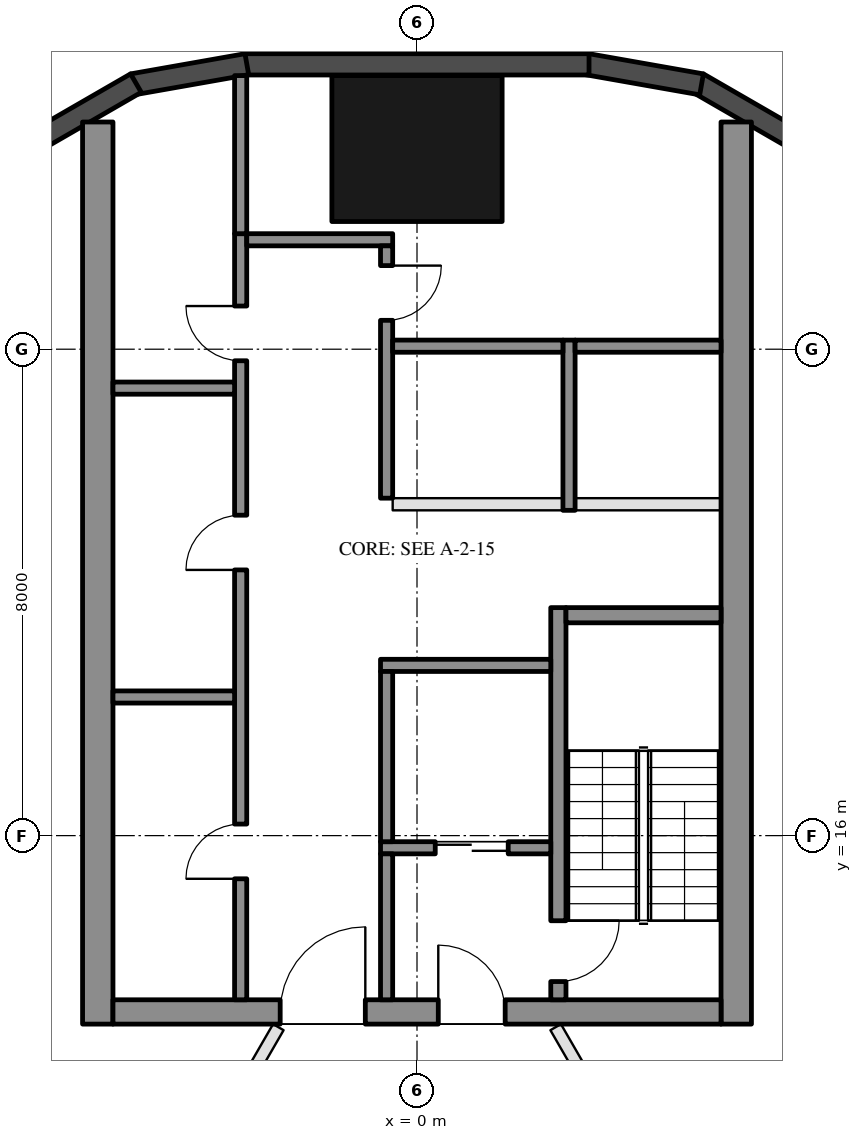
"""IFC4 building model, lengths in metres.
Left out: names, types, materials, properties, quantities, classifications, styles, units other than length and angle.
Written with IfcOpenShell. Run it as: python <this file> out.ifc"""

import sys

from ifc_helpers import new_model, si_unit, direction, frame, frame_2d, origin, origin_2d, place, context, subcontext, project, spatial, rectangle, hollow_rectangle, extrude, element, fill, save


model = new_model("IFC4")
c1 = context("Model", 3, precision=1e-05, world=origin(), true_north=direction((0.0, 1.0)))
c2 = subcontext(c1, "Body", "Model", "MODEL_VIEW")
j1 = project(units=[si_unit("LENGTHUNIT", "METRE"), si_unit("PLANEANGLEUNIT", "RADIAN")], contexts=[c1])
p1 = place(None, origin())
s1 = spatial("IfcSite", under=j1, at=p1, CompositionType="ELEMENT")
p2 = place(p1, origin())
s2 = spatial("IfcBuilding", under=s1, at=p2, CompositionType="ELEMENT")
p3 = place(p2, frame((0.0, 0.0, 76.1)))
s3 = spatial("IfcBuildingStorey", under=s2, at=p3, CompositionType="ELEMENT", Elevation=76.1)
p4 = place(p3, frame((0.0, 27.3, 0.0), z_axis=(0.0, 0.0, 1.0), x_axis=(1.0, 0.0, 0.0)))
e1 = element("IfcColumn", 1, at=p4, inside=s3, PredefinedType="COLUMN", context=c2, shape_type="SweptSolid", body=[
    extrude(hollow_rectangle(XDim=2.8, YDim=2.4, WallThickness=0.07, at=origin_2d()), origin(), (0.0, 0.0, 1.0), 3.7),
])
for number, where, z_axis, x_axis in (
    (2, (6.277, 27.422, 0.0), (0.0, 0.0, 1.0), (-0.866, 0.5, 0.0)),
    (3, (4.68, 28.356, 0.0), (0.0, 0.0, 1.0), (-0.985, 0.174, 0.0)),
):
    element("IfcWall", number, at=place(p3, frame(where, z_axis=z_axis, x_axis=x_axis)), inside=s3, PredefinedType="SOLIDWALL", context=c2, shape_type="SweptSolid", body=[
        extrude(rectangle(XDim=1.91, YDim=0.35, at=frame_2d((0.955, 0.0))), origin(), (0.0, 0.0, 1.0), 3.55),
    ])
p5 = place(p3, frame((2.829, 28.685, 0.0), z_axis=(0.0, 0.0, 1.0), x_axis=(-1.0, 0.0, 0.0)))
e4 = element("IfcWall", 4, at=p5, inside=s3, PredefinedType="SOLIDWALL", context=c2, shape_type="SweptSolid", body=[
    extrude(rectangle(XDim=5.658, YDim=0.35, at=frame_2d((2.829, 0.0))), origin(), (0.0, 0.0, 1.0), 3.55),
])
for number, where, z_axis, x_axis in (
    (5, (-2.799, 28.688, 0.0), (0.0, 0.0, 1.0), (-0.985, -0.174, 0.0)),
    (6, (-4.623, 28.377, 0.0), (0.0, 0.0, 1.0), (-0.866, -0.5, 0.0)),
):
    element("IfcWall", number, at=place(p3, frame(where, z_axis=z_axis, x_axis=x_axis)), inside=s3, PredefinedType="SOLIDWALL", context=c2, shape_type="SweptSolid", body=[
        extrude(rectangle(XDim=1.91, YDim=0.35, at=frame_2d((0.955, 0.0))), origin(), (0.0, 0.0, 1.0), 3.55),
    ])
for number, where, z_axis, x_axis in (
    (7, (5.25, 12.9, 0.0), (0.0, 0.0, 1.0), (0.0, 1.0, 0.0)),
    (8, (-5.25, 12.9, 0.0), (0.0, 0.0, 1.0), (0.0, 1.0, 0.0)),
):
    element("IfcWall", number, at=place(p3, frame(where, z_axis=z_axis, x_axis=x_axis)), inside=s3, PredefinedType="SHEAR", context=c2, shape_type="SweptSolid", body=[
        extrude(rectangle(XDim=14.837, YDim=0.5, at=frame_2d((7.418, 0.0))), origin(), (0.0, 0.0, 1.0), 3.5),
    ])
p6 = place(p3, frame((5.0, 13.1, 0.0), z_axis=(0.0, 0.0, 1.0), x_axis=(-1.0, 0.0, 0.0)))
e9 = element("IfcWall", 9, at=p6, inside=s3, PredefinedType="SHEAR", context=c2, shape_type="SweptSolid", body=[
    extrude(rectangle(XDim=10.0, YDim=0.4, at=frame_2d((5.0, 0.0))), origin(), (0.0, 0.0, 1.0), 3.5),
])
p7 = place(p6, frame((3.55, 0.0, 0.0)))
e10 = element("IfcOpeningElement", 10, at=p7, cuts=e9, PredefinedType="OPENING", context=c2, shape_type="SweptSolid", body=[
    extrude(rectangle(XDim=1.1, YDim=2.1, at=frame_2d((0.55, 1.05))), frame((0.0, 0.21, 0.0), z_axis=(0.0, -1.0, 0.0), x_axis=(1.0, 0.0, 0.0)), (0.0, 0.0, 1.0), 0.42),
])
p8 = place(p6, frame((5.85, 0.0, 0.0)))
e11 = element("IfcOpeningElement", 11, at=p8, cuts=e9, PredefinedType="OPENING", context=c2, shape_type="SweptSolid", body=[
    extrude(rectangle(XDim=1.4, YDim=2.1, at=frame_2d((0.7, 1.05))), frame((0.0, 0.21, 0.0), z_axis=(0.0, -1.0, 0.0), x_axis=(1.0, 0.0, 0.0)), (0.0, 0.0, 1.0), 0.42),
])
p9 = place(p3, frame((2.325, 13.3, 0.0), z_axis=(0.0, 0.0, 1.0), x_axis=(0.0, 1.0, 0.0)))
e12 = element("IfcWall", 12, at=p9, inside=s3, PredefinedType="SHEAR", context=c2, shape_type="SweptSolid", body=[
    extrude(rectangle(XDim=6.45, YDim=0.25, at=frame_2d((3.225, 0.0))), origin(), (0.0, 0.0, 1.0), 3.5),
])
p10 = place(p9, frame((0.3, 0.0, 0.0)))
e13 = element("IfcOpeningElement", 13, at=p10, cuts=e12, PredefinedType="OPENING", context=c2, shape_type="SweptSolid", body=[
    extrude(rectangle(XDim=1.0, YDim=2.1, at=frame_2d((0.5, 1.05))), frame((0.0, 0.135, 0.0), z_axis=(0.0, -1.0, 0.0), x_axis=(1.0, 0.0, 0.0)), (0.0, 0.0, 1.0), 0.27),
])
p11 = place(p3, frame((5.0, 19.625, 0.0), z_axis=(0.0, 0.0, 1.0), x_axis=(-1.0, 0.0, 0.0)))
e14 = element("IfcWall", 14, at=p11, inside=s3, PredefinedType="SHEAR", context=c2, shape_type="SweptSolid", body=[
    extrude(rectangle(XDim=2.55, YDim=0.25, at=frame_2d((1.275, 0.0))), origin(), (0.0, 0.0, 1.0), 3.5),
])
p12 = place(p3, frame((2.2, 18.8, 0.0), z_axis=(0.0, 0.0, 1.0), x_axis=(-1.0, 0.0, 0.0)))
e15 = element("IfcWall", 15, at=p12, inside=s3, PredefinedType="SHEAR", context=c2, shape_type="SweptSolid", body=[
    extrude(rectangle(XDim=2.8, YDim=0.2, at=frame_2d((1.4, 0.0))), origin(), (0.0, 0.0, 1.0), 3.5),
])
p13 = place(p3, frame((2.2, 15.8, 0.0), z_axis=(0.0, 0.0, 1.0), x_axis=(-1.0, 0.0, 0.0)))
e16 = element("IfcWall", 16, at=p13, inside=s3, PredefinedType="SHEAR", context=c2, shape_type="SweptSolid", body=[
    extrude(rectangle(XDim=2.8, YDim=0.2, at=frame_2d((1.4, 0.0))), origin(), (0.0, 0.0, 1.0), 3.5),
])
p14 = place(p13, frame((0.7, 0.0, 0.0)))
e17 = element("IfcOpeningElement", 17, at=p14, cuts=e16, PredefinedType="OPENING", context=c2, shape_type="SweptSolid", body=[
    extrude(rectangle(XDim=1.2, YDim=2.1, at=frame_2d((0.6, 1.05))), frame((0.0, 0.11, 0.0), z_axis=(0.0, -1.0, 0.0), x_axis=(1.0, 0.0, 0.0)), (0.0, 0.0, 1.0), 0.22),
])
p15 = place(p3, frame((-0.5, 15.9, 0.0), z_axis=(0.0, 0.0, 1.0), x_axis=(0.0, 1.0, 0.0)))
e18 = element("IfcWall", 18, at=p15, inside=s3, PredefinedType="SHEAR", context=c2, shape_type="SweptSolid", body=[
    extrude(rectangle(XDim=2.8, YDim=0.2, at=frame_2d((1.4, 0.0))), origin(), (0.0, 0.0, 1.0), 3.5),
])
p16 = place(p3, frame((-0.5, 13.3, 0.0), z_axis=(0.0, 0.0, 1.0), x_axis=(0.0, 1.0, 0.0)))
e19 = element("IfcWall", 19, at=p16, inside=s3, PredefinedType="SHEAR", context=c2, shape_type="SweptSolid", body=[
    extrude(rectangle(XDim=2.4, YDim=0.2, at=frame_2d((1.2, 0.0))), origin(), (0.0, 0.0, 1.0), 3.5),
])
p17 = place(p3, frame((-2.9, 13.3, 0.0), z_axis=(0.0, 0.0, 1.0), x_axis=(0.0, 1.0, 0.0)))
e20 = element("IfcWall", 20, at=p17, inside=s3, PredefinedType="SHEAR", context=c2, shape_type="SweptSolid", body=[
    extrude(rectangle(XDim=12.6, YDim=0.2, at=frame_2d((6.3, 0.0))), origin(), (0.0, 0.0, 1.0), 3.5),
])
p18 = place(p17, frame((1.99, 0.0, 0.0)))
e21 = element("IfcOpeningElement", 21, at=p18, cuts=e20, PredefinedType="OPENING", context=c2, shape_type="SweptSolid", body=[
    extrude(rectangle(XDim=0.9, YDim=2.1, at=frame_2d((0.45, 1.05))), frame((0.0, 0.11, 0.0), z_axis=(0.0, -1.0, 0.0), x_axis=(1.0, 0.0, 0.0)), (0.0, 0.0, 1.0), 0.22),
])
p19 = place(p17, frame((7.07, 0.0, 0.0)))
e22 = element("IfcOpeningElement", 22, at=p19, cuts=e20, PredefinedType="OPENING", context=c2, shape_type="SweptSolid", body=[
    extrude(rectangle(XDim=0.9, YDim=2.1, at=frame_2d((0.45, 1.05))), frame((0.0, 0.11, 0.0), z_axis=(0.0, -1.0, 0.0), x_axis=(1.0, 0.0, 0.0)), (0.0, 0.0, 1.0), 0.22),
])
p20 = place(p17, frame((10.51, 0.0, 0.0)))
e23 = element("IfcOpeningElement", 23, at=p20, cuts=e20, PredefinedType="OPENING", context=c2, shape_type="SweptSolid", body=[
    extrude(rectangle(XDim=0.9, YDim=2.1, at=frame_2d((0.45, 1.05))), frame((0.0, 0.11, 0.0), z_axis=(0.0, -1.0, 0.0), x_axis=(1.0, 0.0, 0.0)), (0.0, 0.0, 1.0), 0.22),
])
p21 = place(p3, frame((-0.4, 25.8, 0.0), z_axis=(0.0, 0.0, 1.0), x_axis=(-1.0, 0.0, 0.0)))
e24 = element("IfcWall", 24, at=p21, inside=s3, PredefinedType="SHEAR", context=c2, shape_type="SweptSolid", body=[
    extrude(rectangle(XDim=2.4, YDim=0.2, at=frame_2d((1.2, 0.0))), origin(), (0.0, 0.0, 1.0), 3.5),
])
p22 = place(p3, frame((-0.5, 21.55, 0.0), z_axis=(0.0, 0.0, 1.0), x_axis=(0.0, 1.0, 0.0)))
e25 = element("IfcWall", 25, at=p22, inside=s3, PredefinedType="SHEAR", context=c2, shape_type="SweptSolid", body=[
    extrude(rectangle(XDim=4.15, YDim=0.2, at=frame_2d((2.075, 0.0))), origin(), (0.0, 0.0, 1.0), 3.5),
])
p23 = place(p22, frame((2.925, 0.0, 0.0)))
e26 = element("IfcOpeningElement", 26, at=p23, cuts=e25, PredefinedType="OPENING", context=c2, shape_type="SweptSolid", body=[
    extrude(rectangle(XDim=0.9, YDim=2.1, at=frame_2d((0.45, 1.05))), frame((0.0, 0.11, 0.0), z_axis=(0.0, -1.0, 0.0), x_axis=(1.0, 0.0, 0.0)), (0.0, 0.0, 1.0), 0.22),
])
for number, where, z_axis, x_axis in (
    (27, (-3.0, 18.28, 0.0), (0.0, 0.0, 1.0), (-1.0, 0.0, 0.0)),
    (28, (-3.0, 23.36, 0.0), (0.0, 0.0, 1.0), (-1.0, 0.0, 0.0)),
):
    element("IfcWall", number, at=place(p3, frame(where, z_axis=z_axis, x_axis=x_axis)), inside=s3, PredefinedType="SHEAR", context=c2, shape_type="SweptSolid", body=[
        extrude(rectangle(XDim=2.0, YDim=0.2, at=frame_2d((1.0, 0.0))), origin(), (0.0, 0.0, 1.0), 3.5),
    ])
p24 = place(p3, frame((-2.9, 25.9, 0.0), z_axis=(0.0, 0.0, 1.0), x_axis=(0.0, 1.0, 0.0)))
e29 = element("IfcWall", 29, at=p24, inside=s3, PredefinedType="SHEAR", context=c2, shape_type="SweptSolid", body=[
    extrude(rectangle(XDim=2.6, YDim=0.2, at=frame_2d((1.3, 0.0))), origin(), (0.0, 0.0, 1.0), 3.5),
])
p25 = place(p3, frame((2.5, 21.35, 0.0), z_axis=(0.0, 0.0, 1.0), x_axis=(0.0, 1.0, 0.0)))
e30 = element("IfcWall", 30, at=p25, inside=s3, PredefinedType="SHEAR", context=c2, shape_type="SweptSolid", body=[
    extrude(rectangle(XDim=2.8, YDim=0.2, at=frame_2d((1.4, 0.0))), origin(), (0.0, 0.0, 1.0), 3.5),
])
p26 = place(p3, frame((5.0, 24.05, 0.0), z_axis=(0.0, 0.0, 1.0), x_axis=(-1.0, 0.0, 0.0)))
e31 = element("IfcWall", 31, at=p26, inside=s3, PredefinedType="SHEAR", context=c2, shape_type="SweptSolid", body=[
    extrude(rectangle(XDim=2.4, YDim=0.2, at=frame_2d((1.2, 0.0))), origin(), (0.0, 0.0, 1.0), 3.5),
])
p27 = place(p3, frame((2.4, 24.05, 0.0), z_axis=(0.0, 0.0, 1.0), x_axis=(-1.0, 0.0, 0.0)))
e32 = element("IfcWall", 32, at=p27, inside=s3, PredefinedType="SHEAR", context=c2, shape_type="SweptSolid", body=[
    extrude(rectangle(XDim=2.8, YDim=0.2, at=frame_2d((1.4, 0.0))), origin(), (0.0, 0.0, 1.0), 3.5),
])
p28 = place(p3, frame((5.0, 21.45, 0.0), z_axis=(0.0, 0.0, 1.0), x_axis=(-1.0, 0.0, 0.0)))
e33 = element("IfcWall", 33, at=p28, inside=s3, PredefinedType="PARTITIONING", context=c2, shape_type="SweptSolid", body=[
    extrude(rectangle(XDim=2.4, YDim=0.2, at=frame_2d((1.2, 0.0))), origin(), (0.0, 0.0, 1.0), 3.5),
])
p29 = place(p3, frame((2.4, 21.45, 0.0), z_axis=(0.0, 0.0, 1.0), x_axis=(-1.0, 0.0, 0.0)))
e34 = element("IfcWall", 34, at=p29, inside=s3, PredefinedType="PARTITIONING", context=c2, shape_type="SweptSolid", body=[
    extrude(rectangle(XDim=2.8, YDim=0.2, at=frame_2d((1.4, 0.0))), origin(), (0.0, 0.0, 1.0), 3.5),
])
p30 = place(p3, frame((-13.556, 13.281, 0.0), z_axis=(0.0, 0.0, 1.0), x_axis=(0.889110909618, -0.457691807223, 0.0)))
e35 = element("IfcWall", 35, at=p30, inside=s3, PredefinedType="PARTITIONING", context=c2, shape_type="SweptSolid", body=[
    extrude(rectangle(XDim=10.092, YDim=0.2, at=frame_2d((5.046, 0.0))), origin(), (0.0, 0.0, 1.0), 2.96),
])
p31 = place(p3, frame((2.281, 12.85, 0.0), z_axis=(0.0, 0.0, 1.0), x_axis=(0.499986710104, -0.866033076574, 0.0)))
e36 = element("IfcWall", 36, at=p31, inside=s3, PredefinedType="PARTITIONING", context=c2, shape_type="SweptSolid", body=[
    extrude(rectangle(XDim=9.384, YDim=0.2, at=frame_2d((4.692, 0.0))), origin(), (0.0, 0.0, 1.0), 2.95),
])
p32 = place(p31, frame((4.192, 0.0, 0.0)))
e37 = element("IfcOpeningElement", 37, at=p32, cuts=e36, PredefinedType="OPENING", context=c2, shape_type="SweptSolid", body=[
    extrude(rectangle(XDim=1.0, YDim=2.1, at=frame_2d((0.5, 1.05))), frame((0.0, 0.11, 0.0), z_axis=(0.0, -1.0, 0.0), x_axis=(1.0, 0.0, 0.0)), (0.0, 0.0, 1.0), 0.22),
])
p33 = place(p3, frame((-4.622, 8.794, 0.0), z_axis=(0.0, 0.0, 1.0), x_axis=(0.499979668266, 0.866037141998, 0.0)))
e38 = element("IfcWall", 38, at=p33, inside=s3, PredefinedType="PARTITIONING", context=c2, shape_type="SweptSolid", body=[
    extrude(rectangle(XDim=4.683, YDim=0.2, at=frame_2d((2.342, 0.0))), origin(), (0.0, 0.0, 1.0), 2.95),
])
p34 = place(p33, frame((1.842, 0.0, 0.0)))
e39 = element("IfcOpeningElement", 39, at=p34, cuts=e38, PredefinedType="OPENING", context=c2, shape_type="SweptSolid", body=[
    extrude(rectangle(XDim=1.0, YDim=2.1, at=frame_2d((0.5, 1.05))), frame((0.0, 0.11, 0.0), z_axis=(0.0, -1.0, 0.0), x_axis=(1.0, 0.0, 0.0)), (0.0, 0.0, 1.0), 0.22),
])
p35 = place(p14, origin())
e40 = element("IfcDoor", 40, at=p35, inside=s3, OperationType="DOUBLE_DOOR_SLIDING", PredefinedType="DOOR", context=c2, shape_type="SweptSolid", body=[
    extrude(rectangle(XDim=1.2, YDim=2.1, at=frame_2d((0.6, 1.05))), frame((0.0, 0.025, 0.0), z_axis=(0.0, -1.0, 0.0), x_axis=(1.0, 0.0, 0.0)), (0.0, 0.0, 1.0), 0.05),
])
fill(e17, e40)
p36 = place(p18, origin())
e41 = element("IfcDoor", 41, at=p36, inside=s3, OperationType="SINGLE_SWING_LEFT", PredefinedType="DOOR", context=c2, shape_type="SweptSolid", body=[
    extrude(rectangle(XDim=0.9, YDim=2.1, at=frame_2d((0.45, 1.05))), frame((0.0, 0.025, 0.0), z_axis=(0.0, -1.0, 0.0), x_axis=(1.0, 0.0, 0.0)), (0.0, 0.0, 1.0), 0.05),
])
fill(e21, e41)
p37 = place(p19, origin())
e42 = element("IfcDoor", 42, at=p37, inside=s3, OperationType="SINGLE_SWING_LEFT", PredefinedType="DOOR", context=c2, shape_type="SweptSolid", body=[
    extrude(rectangle(XDim=0.9, YDim=2.1, at=frame_2d((0.45, 1.05))), frame((0.0, 0.025, 0.0), z_axis=(0.0, -1.0, 0.0), x_axis=(1.0, 0.0, 0.0)), (0.0, 0.0, 1.0), 0.05),
])
fill(e22, e42)
p38 = place(p20, origin())
e43 = element("IfcDoor", 43, at=p38, inside=s3, OperationType="SINGLE_SWING_RIGHT", PredefinedType="DOOR", context=c2, shape_type="SweptSolid", body=[
    extrude(rectangle(XDim=0.9, YDim=2.1, at=frame_2d((0.45, 1.05))), frame((0.0, 0.025, 0.0), z_axis=(0.0, -1.0, 0.0), x_axis=(1.0, 0.0, 0.0)), (0.0, 0.0, 1.0), 0.05),
])
fill(e23, e43)
p39 = place(p23, frame((0.9, 0.0, 0.0), z_axis=(0.0, 0.0, 1.0), x_axis=(-1.0, 0.0, 0.0)))
e44 = element("IfcDoor", 44, at=p39, inside=s3, OperationType="SINGLE_SWING_LEFT", PredefinedType="DOOR", context=c2, shape_type="SweptSolid", body=[
    extrude(rectangle(XDim=0.9, YDim=2.1, at=frame_2d((0.45, 1.05))), frame((0.0, 0.025, 0.0), z_axis=(0.0, -1.0, 0.0), x_axis=(1.0, 0.0, 0.0)), (0.0, 0.0, 1.0), 0.05),
])
fill(e26, e44)
p40 = place(p7, frame((1.1, 0.0, 0.0), z_axis=(0.0, 0.0, 1.0), x_axis=(-1.0, 0.0, 0.0)))
e45 = element("IfcDoor", 45, at=p40, inside=s3, OperationType="SINGLE_SWING_LEFT", PredefinedType="DOOR", context=c2, shape_type="SweptSolid", body=[
    extrude(rectangle(XDim=1.1, YDim=2.1, at=frame_2d((0.55, 1.05))), frame((0.0, 0.025, 0.0), z_axis=(0.0, -1.0, 0.0), x_axis=(1.0, 0.0, 0.0)), (0.0, 0.0, 1.0), 0.05),
])
fill(e10, e45)
p41 = place(p8, frame((1.4, 0.0, 0.0), z_axis=(0.0, 0.0, 1.0), x_axis=(-1.0, 0.0, 0.0)))
e46 = element("IfcDoor", 46, at=p41, inside=s3, OperationType="DOUBLE_DOOR_SINGLE_SWING", PredefinedType="DOOR", context=c2, shape_type="SweptSolid", body=[
    extrude(rectangle(XDim=1.4, YDim=2.1, at=frame_2d((0.7, 1.05))), frame((0.0, 0.025, 0.0), z_axis=(0.0, -1.0, 0.0), x_axis=(1.0, 0.0, 0.0)), (0.0, 0.0, 1.0), 0.05),
])
fill(e11, e46)
p42 = place(p10, frame((1.0, 0.0, 0.0), z_axis=(0.0, 0.0, 1.0), x_axis=(-1.0, 0.0, 0.0)))
e47 = element("IfcDoor", 47, at=p42, inside=s3, OperationType="SINGLE_SWING_LEFT", PredefinedType="DOOR", context=c2, shape_type="SweptSolid", body=[
    extrude(rectangle(XDim=1.0, YDim=2.1, at=frame_2d((0.5, 1.05))), frame((0.0, 0.025, 0.0), z_axis=(0.0, -1.0, 0.0), x_axis=(1.0, 0.0, 0.0)), (0.0, 0.0, 1.0), 0.05),
])
fill(e13, e47)
save(model, sys.argv[1])
